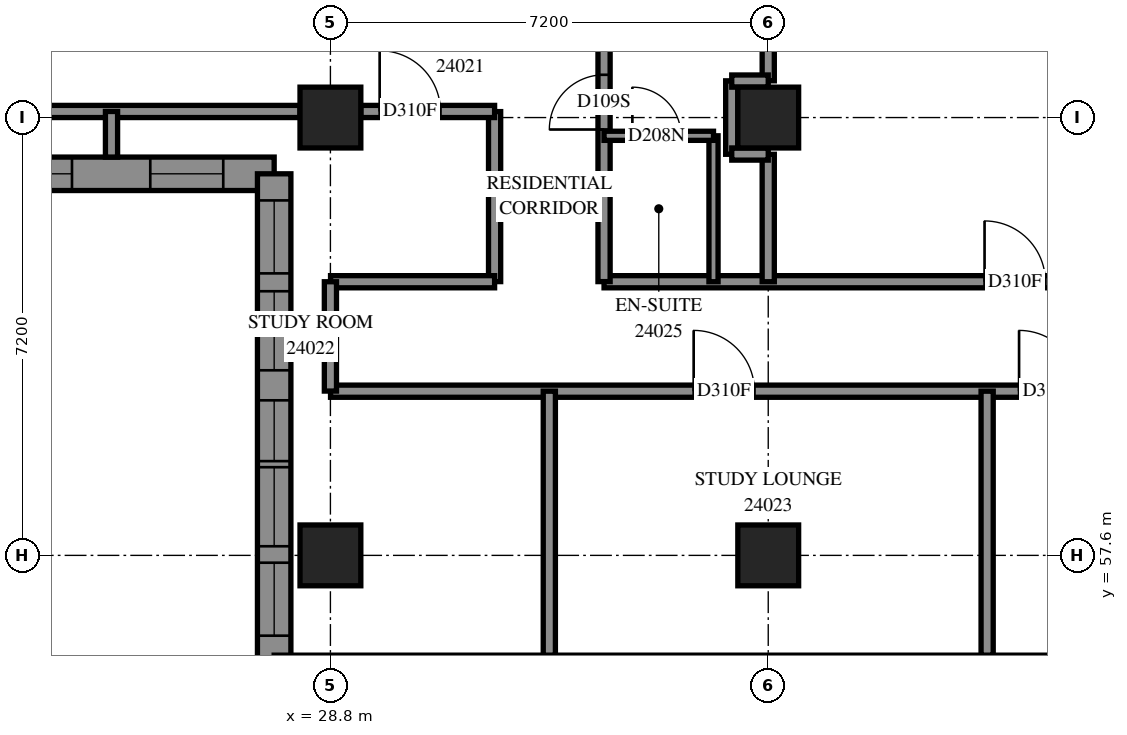
"""IFC4 building model, lengths in metres.
Left out: names, types, materials, properties, quantities, classifications, styles, units other than length and angle.
Written with IfcOpenShell. Run it as: python <this file> out.ifc"""

import sys

from ifc_helpers import new_model, si_unit, direction, frame, frame_2d, origin, origin_2d, place, context, subcontext, project, spatial, polyline, rectangle, outline, extrude, element, fill, save


model = new_model("IFC4")
c1 = context("Model", 3, precision=1e-05, world=origin(), true_north=direction((0.0, 1.0)))
c2 = subcontext(c1, "Body", "Model", "MODEL_VIEW")
j1 = project(units=[si_unit("LENGTHUNIT", "METRE"), si_unit("PLANEANGLEUNIT", "RADIAN")], contexts=[c1])
p1 = place(None, origin())
s1 = spatial("IfcSite", under=j1, at=p1, CompositionType="ELEMENT")
p2 = place(p1, origin())
s2 = spatial("IfcBuilding", under=s1, at=p2, CompositionType="ELEMENT")
p3 = place(p2, frame((0.0, 0.0, 91.4)))
s3 = spatial("IfcBuildingStorey", under=s2, at=p3, CompositionType="ELEMENT", Elevation=91.4)
for number, where, z_axis, x_axis in (
    (1, (28.8, 57.6, 0.0), (0.0, 0.0, 1.0), (1.0, 0.0, 0.0)),
    (2, (28.8, 64.8, 0.0), (0.0, 0.0, 1.0), (1.0, 0.0, 0.0)),
    (3, (36.0, 57.6, 0.0), (0.0, 0.0, 1.0), (1.0, 0.0, 0.0)),
    (4, (36.0, 64.8, 0.0), (0.0, 0.0, 1.0), (1.0, 0.0, 0.0)),
):
    element("IfcColumn", number, at=place(p3, frame(where, z_axis=z_axis, x_axis=x_axis)), inside=s3, PredefinedType="COLUMN", context=c2, shape_type="SweptSolid", body=[
        extrude(rectangle(XDim=1.0, YDim=1.0, at=origin_2d()), origin(), (0.0, 0.0, 1.0), 3.1),
    ])
p4 = place(p3, frame((19.684, 63.875, 0.0), z_axis=(0.0, 0.0, 1.0), x_axis=(1.0, 0.0, 0.0)))
e5 = element("IfcWall", 5, at=p4, inside=s3, PredefinedType="SOLIDWALL", context=c2, shape_type="SweptSolid", body=[
    extrude(outline(polyline([(-0.275, -0.275), (7.916, -0.275), (8.466, 0.275), (0.275, 0.275), (-0.275, -0.275)])), origin(), (0.0, 0.0, 1.0), 3.1),
])
p5 = place(p4, frame((2.066, 0.0, 0.5)))
e6 = element("IfcOpeningElement", 6, at=p5, cuts=e5, PredefinedType="OPENING", context=c2, shape_type="SweptSolid", body=[
    extrude(rectangle(XDim=1.3, YDim=2.45, at=frame_2d((0.65, 1.225))), frame((0.0, 0.285, 0.0), z_axis=(0.0, -1.0, 0.0), x_axis=(1.0, 0.0, 0.0)), (0.0, 0.0, 1.0), 0.57),
])
p6 = place(p4, frame((3.566, 0.0, 0.5)))
e7 = element("IfcOpeningElement", 7, at=p6, cuts=e5, PredefinedType="OPENING", context=c2, shape_type="SweptSolid", body=[
    extrude(rectangle(XDim=1.3, YDim=2.45, at=frame_2d((0.65, 1.225))), frame((0.0, 0.285, 0.0), z_axis=(0.0, -1.0, 0.0), x_axis=(1.0, 0.0, 0.0)), (0.0, 0.0, 1.0), 0.57),
])
p7 = place(p4, frame((0.596, 0.0, 0.5)))
e8 = element("IfcOpeningElement", 8, at=p7, cuts=e5, PredefinedType="OPENING", context=c2, shape_type="SweptSolid", body=[
    extrude(rectangle(XDim=1.2, YDim=2.45, at=frame_2d((0.6, 1.225))), frame((0.0, 0.285, 0.0), z_axis=(0.0, -1.0, 0.0), x_axis=(1.0, 0.0, 0.0)), (0.0, 0.0, 1.0), 0.57),
])
p8 = place(p4, frame((6.154, 0.0, 0.5)))
e9 = element("IfcOpeningElement", 9, at=p8, cuts=e5, PredefinedType="OPENING", context=c2, shape_type="SweptSolid", body=[
    extrude(rectangle(XDim=1.2, YDim=2.45, at=frame_2d((0.6, 1.225))), frame((0.0, 0.285, 0.0), z_axis=(0.0, -1.0, 0.0), x_axis=(1.0, 0.0, 0.0)), (0.0, 0.0, 1.0), 0.57),
])
p9 = place(p3, frame((27.875, 63.875, 0.0), z_axis=(0.0, 0.0, 1.0), x_axis=(0.0, -1.0, 0.0)))
e10 = element("IfcWall", 10, at=p9, inside=s3, PredefinedType="SOLIDWALL", context=c2, shape_type="SweptSolid", body=[
    extrude(outline(polyline([(0.275, -0.275), (8.466, -0.275), (7.916, 0.275), (-0.275, 0.275), (0.275, -0.275)])), origin(), (0.0, 0.0, 1.0), 3.1),
])
p10 = place(p9, frame((4.825, 0.0, 0.5)))
e11 = element("IfcOpeningElement", 11, at=p10, cuts=e10, PredefinedType="OPENING", context=c2, shape_type="SweptSolid", body=[
    extrude(rectangle(XDim=1.3, YDim=2.45, at=frame_2d((0.65, 1.225))), frame((0.0, 0.285, 0.0), z_axis=(0.0, -1.0, 0.0), x_axis=(1.0, 0.0, 0.0)), (0.0, 0.0, 1.0), 0.57),
])
p11 = place(p9, frame((0.438, 0.0, 0.5)))
e12 = element("IfcOpeningElement", 12, at=p11, cuts=e10, PredefinedType="OPENING", context=c2, shape_type="SweptSolid", body=[
    extrude(rectangle(XDim=1.2, YDim=2.45, at=frame_2d((0.6, 1.225))), frame((0.0, 0.285, 0.0), z_axis=(0.0, -1.0, 0.0), x_axis=(1.0, 0.0, 0.0)), (0.0, 0.0, 1.0), 0.57),
])
p12 = place(p9, frame((6.396, 0.0, 0.5)))
e13 = element("IfcOpeningElement", 13, at=p12, cuts=e10, PredefinedType="OPENING", context=c2, shape_type="SweptSolid", body=[
    extrude(rectangle(XDim=1.2, YDim=2.45, at=frame_2d((0.6, 1.225))), frame((0.0, 0.285, 0.0), z_axis=(0.0, -1.0, 0.0), x_axis=(1.0, 0.0, 0.0)), (0.0, 0.0, 1.0), 0.57),
])
p13 = place(p9, frame((1.931, 0.0, 0.5)))
e14 = element("IfcOpeningElement", 14, at=p13, cuts=e10, PredefinedType="OPENING", context=c2, shape_type="SweptSolid", body=[
    extrude(rectangle(XDim=1.3, YDim=2.45, at=frame_2d((0.65, 1.225))), frame((0.0, 0.285, 0.0), z_axis=(0.0, -1.0, 0.0), x_axis=(1.0, 0.0, 0.0)), (0.0, 0.0, 1.0), 0.57),
])
p14 = place(p9, frame((3.725, 0.0, 0.45)))
e15 = element("IfcOpeningElement", 15, at=p14, cuts=e10, PredefinedType="OPENING", context=c2, shape_type="SweptSolid", body=[
    extrude(rectangle(XDim=1.0, YDim=2.5, at=frame_2d((0.5, 1.25))), frame((0.0, 0.285, 0.0), z_axis=(0.0, -1.0, 0.0), x_axis=(1.0, 0.0, 0.0)), (0.0, 0.0, 1.0), 0.57),
])
p15 = place(p3, frame((28.802, 60.3, 0.0), z_axis=(0.0, 0.0, 1.0), x_axis=(1.0, 0.0, 0.0)))
e16 = element("IfcWall", 16, at=p15, inside=s3, PredefinedType="PARTITIONING", context=c2, shape_type="SweptSolid", body=[
    extrude(rectangle(XDim=24.298, YDim=0.2, at=frame_2d((12.149, 0.0))), origin(), (0.0, 0.0, 1.0), 3.1),
])
p16 = place(p15, frame((5.972, 0.0, 0.0)))
e17 = element("IfcOpeningElement", 17, at=p16, cuts=e16, PredefinedType="OPENING", context=c2, shape_type="SweptSolid", body=[
    extrude(rectangle(XDim=1.0, YDim=2.1, at=frame_2d((0.5, 1.05))), frame((0.0, 0.11, 0.0), z_axis=(0.0, -1.0, 0.0), x_axis=(1.0, 0.0, 0.0)), (0.0, 0.0, 1.0), 0.22),
])
p17 = place(p15, frame((11.323, 0.0, 0.0)))
e18 = element("IfcOpeningElement", 18, at=p17, cuts=e16, PredefinedType="OPENING", context=c2, shape_type="SweptSolid", body=[
    extrude(rectangle(XDim=1.0, YDim=2.1, at=frame_2d((0.5, 1.05))), frame((0.0, 0.11, 0.0), z_axis=(0.0, -1.0, 0.0), x_axis=(1.0, 0.0, 0.0)), (0.0, 0.0, 1.0), 0.22),
])
p18 = place(p15, frame((14.798, 0.0, 0.0)))
e19 = element("IfcOpeningElement", 19, at=p18, cuts=e16, PredefinedType="OPENING", context=c2, shape_type="SweptSolid", body=[
    extrude(rectangle(XDim=0.9, YDim=2.1, at=frame_2d((0.45, 1.05))), frame((0.0, 0.11, 0.0), z_axis=(0.0, -1.0, 0.0), x_axis=(1.0, 0.0, 0.0)), (0.0, 0.0, 1.0), 0.22),
])
p19 = place(p15, frame((18.833, 0.0, 0.0)))
e20 = element("IfcOpeningElement", 20, at=p19, cuts=e16, PredefinedType="OPENING", context=c2, shape_type="SweptSolid", body=[
    extrude(rectangle(XDim=1.0, YDim=2.1, at=frame_2d((0.5, 1.05))), frame((0.0, 0.11, 0.0), z_axis=(0.0, -1.0, 0.0), x_axis=(1.0, 0.0, 0.0)), (0.0, 0.0, 1.0), 0.22),
])
p20 = place(p15, frame((23.151, 0.0, 0.0)))
e21 = element("IfcOpeningElement", 21, at=p20, cuts=e16, PredefinedType="OPENING", context=c2, shape_type="SweptSolid", body=[
    extrude(rectangle(XDim=1.0, YDim=2.1, at=frame_2d((0.5, 1.05))), frame((0.0, 0.11, 0.0), z_axis=(0.0, -1.0, 0.0), x_axis=(1.0, 0.0, 0.0)), (0.0, 0.0, 1.0), 0.22),
])
p21 = place(p3, frame((33.3, 62.1, 0.0), z_axis=(0.0, 0.0, 1.0), x_axis=(1.0, 0.0, 0.0)))
e22 = element("IfcWall", 22, at=p21, inside=s3, PredefinedType="PARTITIONING", context=c2, shape_type="SweptSolid", body=[
    extrude(rectangle(XDim=17.1, YDim=0.2, at=frame_2d((8.55, 0.0))), origin(), (0.0, 0.0, 1.0), 3.1),
])
p22 = place(p21, frame((6.258, 0.0, 0.0)))
e23 = element("IfcOpeningElement", 23, at=p22, cuts=e22, PredefinedType="OPENING", context=c2, shape_type="SweptSolid", body=[
    extrude(rectangle(XDim=1.0, YDim=2.1, at=frame_2d((0.5, 1.05))), frame((0.0, 0.11, 0.0), z_axis=(0.0, -1.0, 0.0), x_axis=(1.0, 0.0, 0.0)), (0.0, 0.0, 1.0), 0.22),
])
p23 = place(p21, frame((10.148, 0.0, 0.0)))
e24 = element("IfcOpeningElement", 24, at=p23, cuts=e22, PredefinedType="OPENING", context=c2, shape_type="SweptSolid", body=[
    extrude(rectangle(XDim=0.9, YDim=2.1, at=frame_2d((0.45, 1.05))), frame((0.0, 0.11, 0.0), z_axis=(0.0, -1.0, 0.0), x_axis=(1.0, 0.0, 0.0)), (0.0, 0.0, 1.0), 0.22),
])
p24 = place(p21, frame((15.729, 0.0, 0.0)))
e25 = element("IfcOpeningElement", 25, at=p24, cuts=e22, PredefinedType="OPENING", context=c2, shape_type="SweptSolid", body=[
    extrude(rectangle(XDim=0.9, YDim=2.1, at=frame_2d((0.45, 1.05))), frame((0.0, 0.11, 0.0), z_axis=(0.0, -1.0, 0.0), x_axis=(1.0, 0.0, 0.0)), (0.0, 0.0, 1.0), 0.22),
])
p25 = place(p3, frame((22.1, 64.9, 0.0), z_axis=(0.0, 0.0, 1.0), x_axis=(1.0, 0.0, 0.0)))
e26 = element("IfcWall", 26, at=p25, inside=s3, PredefinedType="PARTITIONING", context=c2, shape_type="SweptSolid", body=[
    extrude(rectangle(XDim=6.2, YDim=0.2, at=frame_2d((3.1, 0.0))), origin(), (0.0, 0.0, 1.0), 2.6),
])
p26 = place(p3, frame((36.0, 65.404, 0.0), z_axis=(0.0, 0.0, 1.0), x_axis=(0.0, 1.0, 0.0)))
e27 = element("IfcWall", 27, at=p26, inside=s3, PredefinedType="PARTITIONING", context=c2, shape_type="SweptSolid", body=[
    extrude(rectangle(XDim=5.992, YDim=0.2, at=frame_2d((2.996, 0.0))), origin(), (0.0, 0.0, 1.0), 3.1),
])
p27 = place(p3, frame((33.3, 62.102, 0.0), z_axis=(0.0, 0.0, 1.0), x_axis=(0.0, 1.0, 0.0)))
e28 = element("IfcWall", 28, at=p27, inside=s3, PredefinedType="PARTITIONING", context=c2, shape_type="SweptSolid", body=[
    extrude(rectangle(XDim=4.598, YDim=0.2, at=frame_2d((2.299, 0.0))), origin(), (0.0, 0.0, 1.0), 3.1),
])
p28 = place(p27, frame((2.501, 0.0, 0.0)))
e29 = element("IfcOpeningElement", 29, at=p28, cuts=e28, PredefinedType="OPENING", context=c2, shape_type="SweptSolid", body=[
    extrude(rectangle(XDim=0.9, YDim=2.1, at=frame_2d((0.45, 1.05))), frame((0.0, 0.11, 0.0), z_axis=(0.0, -1.0, 0.0), x_axis=(1.0, 0.0, 0.0)), (0.0, 0.0, 1.0), 0.22),
])
for number, where, z_axis, x_axis in (
    (30, (32.4, 55.959, 0.0), (0.0, 0.0, 1.0), (0.0, 1.0, 0.0)),
    (31, (39.6, 55.959, 0.0), (0.0, 0.0, 1.0), (0.0, 1.0, 0.0)),
):
    element("IfcWall", number, at=place(p3, frame(where, z_axis=z_axis, x_axis=x_axis)), inside=s3, PredefinedType="PARTITIONING", context=c2, shape_type="SweptSolid", body=[
        extrude(rectangle(XDim=4.341, YDim=0.2, at=frame_2d((2.171, 0.0))), origin(), (0.0, 0.0, 1.0), 3.1),
    ])
p29 = place(p3, frame((31.5, 62.102, 0.0), z_axis=(0.0, 0.0, 1.0), x_axis=(0.0, 1.0, 0.0)))
e32 = element("IfcWall", 32, at=p29, inside=s3, PredefinedType="PARTITIONING", context=c2, shape_type="SweptSolid", body=[
    extrude(rectangle(XDim=2.796, YDim=0.2, at=frame_2d((1.398, 0.0))), origin(), (0.0, 0.0, 1.0), 3.1),
])
p30 = place(p3, frame((28.802, 62.1, 0.0), z_axis=(0.0, 0.0, 1.0), x_axis=(1.0, 0.0, 0.0)))
e33 = element("IfcWall", 33, at=p30, inside=s3, PredefinedType="PARTITIONING", context=c2, shape_type="SweptSolid", body=[
    extrude(rectangle(XDim=2.698, YDim=0.2, at=frame_2d((1.349, 0.0))), origin(), (0.0, 0.0, 1.0), 3.1),
])
p31 = place(p3, frame((35.1, 62.1, 0.0), z_axis=(0.0, 0.0, 1.0), x_axis=(0.0, 1.0, 0.0)))
e34 = element("IfcWall", 34, at=p31, inside=s3, PredefinedType="PARTITIONING", context=c2, shape_type="SweptSolid", body=[
    extrude(rectangle(XDim=2.4, YDim=0.15, at=frame_2d((1.2, 0.0))), origin(), (0.0, 0.0, 1.0), 3.1),
])
p32 = place(p3, frame((29.3, 64.9, 0.0), z_axis=(0.0, 0.0, 1.0), x_axis=(1.0, 0.0, 0.0)))
e35 = element("IfcWall", 35, at=p32, inside=s3, PredefinedType="PARTITIONING", context=c2, shape_type="SweptSolid", body=[
    extrude(rectangle(XDim=2.2, YDim=0.2, at=frame_2d((1.1, 0.0))), origin(), (0.0, 0.0, 1.0), 3.1),
])
p33 = place(p32, frame((0.31, 0.0, 0.0)))
e36 = element("IfcOpeningElement", 36, at=p33, cuts=e35, PredefinedType="OPENING", context=c2, shape_type="SweptSolid", body=[
    extrude(rectangle(XDim=1.0, YDim=2.1, at=frame_2d((0.5, 1.05))), frame((0.0, 0.11, 0.0), z_axis=(0.0, -1.0, 0.0), x_axis=(1.0, 0.0, 0.0)), (0.0, 0.0, 1.0), 0.22),
])
p34 = place(p3, frame((36.0, 62.1, 0.0), z_axis=(0.0, 0.0, 1.0), x_axis=(0.0, 1.0, 0.0)))
e37 = element("IfcWall", 37, at=p34, inside=s3, PredefinedType="PARTITIONING", context=c2, shape_type="SweptSolid", body=[
    extrude(rectangle(XDim=2.096, YDim=0.2, at=frame_2d((1.048, 0.0))), origin(), (0.0, 0.0, 1.0), 3.1),
])
p35 = place(p3, frame((33.3, 64.5, 0.0), z_axis=(0.0, 0.0, 1.0), x_axis=(1.0, 0.0, 0.0)))
e38 = element("IfcWall", 38, at=p35, inside=s3, PredefinedType="PARTITIONING", context=c2, shape_type="SweptSolid", body=[
    extrude(rectangle(XDim=1.8, YDim=0.15, at=frame_2d((0.9, 0.0))), origin(), (0.0, 0.0, 1.0), 3.1),
])
p36 = place(p35, frame((0.466, 0.0, 0.0)))
e39 = element("IfcOpeningElement", 39, at=p36, cuts=e38, PredefinedType="OPENING", context=c2, shape_type="SweptSolid", body=[
    extrude(rectangle(XDim=0.8, YDim=2.1, at=frame_2d((0.4, 1.05))), frame((0.0, 0.085, 0.0), z_axis=(0.0, -1.0, 0.0), x_axis=(1.0, 0.0, 0.0)), (0.0, 0.0, 1.0), 0.17),
])
p37 = place(p3, frame((28.8, 60.302, 0.0), z_axis=(0.0, 0.0, 1.0), x_axis=(0.0, 1.0, 0.0)))
e40 = element("IfcWall", 40, at=p37, inside=s3, PredefinedType="PARTITIONING", context=c2, shape_type="SweptSolid", body=[
    extrude(rectangle(XDim=1.798, YDim=0.2, at=frame_2d((0.899, 0.0))), origin(), (0.0, 0.0, 1.0), 2.6),
])
p38 = place(p3, frame((35.4, 64.196, 0.0), z_axis=(0.0, 0.0, 1.0), x_axis=(0.0, 1.0, 0.0)))
e41 = element("IfcWall", 41, at=p38, inside=s3, PredefinedType="PARTITIONING", context=c2, shape_type="SweptSolid", body=[
    extrude(rectangle(XDim=1.208, YDim=0.2, at=frame_2d((0.604, 0.0))), origin(), (0.0, 0.0, 1.0), 3.1),
])
p39 = place(p3, frame((25.2, 64.15, 0.0), z_axis=(0.0, 0.0, 1.0), x_axis=(0.0, 1.0, 0.0)))
e42 = element("IfcWall", 42, at=p39, inside=s3, PredefinedType="PARTITIONING", context=c2, shape_type="SweptSolid", body=[
    extrude(rectangle(XDim=0.75, YDim=0.2, at=frame_2d((0.375, 0.0))), origin(), (0.0, 0.0, 1.0), 3.1),
])
for number, where, z_axis, x_axis in (
    (43, (35.4, 65.4, 0.0), (0.0, 0.0, 1.0), (1.0, 0.0, 0.0)),
    (44, (35.4, 64.2, 0.0), (0.0, 0.0, 1.0), (1.0, 0.0, 0.0)),
):
    element("IfcWall", number, at=place(p3, frame(where, z_axis=z_axis, x_axis=x_axis)), inside=s3, PredefinedType="PARTITIONING", context=c2, shape_type="SweptSolid", body=[
        extrude(rectangle(XDim=0.6, YDim=0.2, at=frame_2d((0.3, 0.0))), origin(), (0.0, 0.0, 1.0), 3.1),
    ])
p40 = place(p6, origin())
e45 = element("IfcWindow", 45, at=p40, inside=s3, PartitioningType="SINGLE_PANEL", PredefinedType="WINDOW", context=c2, shape_type="SweptSolid", body=[
    extrude(rectangle(XDim=1.3, YDim=2.45, at=frame_2d((0.65, 1.225))), frame((0.0, 0.155, 0.0), z_axis=(0.0, -1.0, 0.0), x_axis=(1.0, 0.0, 0.0)), (0.0, 0.0, 1.0), 0.06),
])
fill(e7, e45)
p41 = place(p8, origin())
e46 = element("IfcWindow", 46, at=p41, inside=s3, PartitioningType="SINGLE_PANEL", PredefinedType="WINDOW", context=c2, shape_type="SweptSolid", body=[
    extrude(rectangle(XDim=1.2, YDim=2.45, at=frame_2d((0.6, 1.225))), frame((0.0, 0.155, 0.0), z_axis=(0.0, -1.0, 0.0), x_axis=(1.0, 0.0, 0.0)), (0.0, 0.0, 1.0), 0.06),
])
fill(e9, e46)
p42 = place(p10, origin())
e47 = element("IfcWindow", 47, at=p42, inside=s3, PartitioningType="SINGLE_PANEL", PredefinedType="WINDOW", context=c2, shape_type="SweptSolid", body=[
    extrude(rectangle(XDim=1.3, YDim=2.45, at=frame_2d((0.65, 1.225))), frame((0.0, 0.155, 0.0), z_axis=(0.0, -1.0, 0.0), x_axis=(1.0, 0.0, 0.0)), (0.0, 0.0, 1.0), 0.06),
])
fill(e11, e47)
p43 = place(p11, origin())
e48 = element("IfcWindow", 48, at=p43, inside=s3, PartitioningType="SINGLE_PANEL", PredefinedType="WINDOW", context=c2, shape_type="SweptSolid", body=[
    extrude(rectangle(XDim=1.2, YDim=2.45, at=frame_2d((0.6, 1.225))), frame((0.0, 0.155, 0.0), z_axis=(0.0, -1.0, 0.0), x_axis=(1.0, 0.0, 0.0)), (0.0, 0.0, 1.0), 0.06),
])
fill(e12, e48)
p44 = place(p12, origin())
e49 = element("IfcWindow", 49, at=p44, inside=s3, PartitioningType="SINGLE_PANEL", PredefinedType="WINDOW", context=c2, shape_type="SweptSolid", body=[
    extrude(rectangle(XDim=1.2, YDim=2.45, at=frame_2d((0.6, 1.225))), frame((0.0, 0.155, 0.0), z_axis=(0.0, -1.0, 0.0), x_axis=(1.0, 0.0, 0.0)), (0.0, 0.0, 1.0), 0.06),
])
fill(e13, e49)
p45 = place(p33, origin())
e50 = element("IfcDoor", 50, at=p45, inside=s3, OperationType="SINGLE_SWING_RIGHT", PredefinedType="DOOR", context=c2, shape_type="SweptSolid", body=[
    extrude(rectangle(XDim=1.0, YDim=2.1, at=frame_2d((0.5, 1.05))), frame((0.0, 0.025, 0.0), z_axis=(0.0, -1.0, 0.0), x_axis=(1.0, 0.0, 0.0)), (0.0, 0.0, 1.0), 0.05),
])
fill(e36, e50)
p46 = place(p16, origin())
e51 = element("IfcDoor", 51, at=p46, inside=s3, OperationType="SINGLE_SWING_RIGHT", PredefinedType="DOOR", context=c2, shape_type="SweptSolid", body=[
    extrude(rectangle(XDim=1.0, YDim=2.1, at=frame_2d((0.5, 1.05))), frame((0.0, 0.025, 0.0), z_axis=(0.0, -1.0, 0.0), x_axis=(1.0, 0.0, 0.0)), (0.0, 0.0, 1.0), 0.05),
])
fill(e17, e51)
p47 = place(p28, origin())
e52 = element("IfcDoor", 52, at=p47, inside=s3, OperationType="SINGLE_SWING_LEFT", PredefinedType="DOOR", context=c2, shape_type="SweptSolid", body=[
    extrude(rectangle(XDim=0.9, YDim=2.1, at=frame_2d((0.45, 1.05))), frame((0.0, 0.025, 0.0), z_axis=(0.0, -1.0, 0.0), x_axis=(1.0, 0.0, 0.0)), (0.0, 0.0, 1.0), 0.05),
])
fill(e29, e52)
p48 = place(p36, origin())
e53 = element("IfcDoor", 53, at=p48, inside=s3, OperationType="SINGLE_SWING_RIGHT", PredefinedType="DOOR", context=c2, shape_type="SweptSolid", body=[
    extrude(rectangle(XDim=0.8, YDim=2.1, at=frame_2d((0.4, 1.05))), frame((0.0, 0.025, 0.0), z_axis=(0.0, -1.0, 0.0), x_axis=(1.0, 0.0, 0.0)), (0.0, 0.0, 1.0), 0.05),
])
fill(e39, e53)
p49 = place(p22, origin())
e54 = element("IfcDoor", 54, at=p49, inside=s3, OperationType="SINGLE_SWING_RIGHT", PredefinedType="DOOR", context=c2, shape_type="SweptSolid", body=[
    extrude(rectangle(XDim=1.0, YDim=2.1, at=frame_2d((0.5, 1.05))), frame((0.0, 0.025, 0.0), z_axis=(0.0, -1.0, 0.0), x_axis=(1.0, 0.0, 0.0)), (0.0, 0.0, 1.0), 0.05),
])
fill(e23, e54)
p50 = place(p17, origin())
e55 = element("IfcDoor", 55, at=p50, inside=s3, OperationType="SINGLE_SWING_RIGHT", PredefinedType="DOOR", context=c2, shape_type="SweptSolid", body=[
    extrude(rectangle(XDim=1.0, YDim=2.1, at=frame_2d((0.5, 1.05))), frame((0.0, 0.025, 0.0), z_axis=(0.0, -1.0, 0.0), x_axis=(1.0, 0.0, 0.0)), (0.0, 0.0, 1.0), 0.05),
])
fill(e18, e55)
p51 = place(p13, origin())
e56 = element("IfcWindow", 56, at=p51, inside=s3, PartitioningType="SINGLE_PANEL", PredefinedType="WINDOW", context=c2, shape_type="SweptSolid", body=[
    extrude(rectangle(XDim=1.3, YDim=2.45, at=frame_2d((0.65, 1.225))), frame((0.0, 0.155, 0.0), z_axis=(0.0, -1.0, 0.0), x_axis=(1.0, 0.0, 0.0)), (0.0, 0.0, 1.0), 0.06),
])
fill(e14, e56)
p52 = place(p14, origin())
e57 = element("IfcWindow", 57, at=p52, inside=s3, PartitioningType="SINGLE_PANEL", PredefinedType="WINDOW", context=c2, shape_type="SweptSolid", body=[
    extrude(rectangle(XDim=1.0, YDim=2.5, at=frame_2d((0.5, 1.25))), frame((0.0, 0.155, 0.0), z_axis=(0.0, -1.0, 0.0), x_axis=(1.0, 0.0, 0.0)), (0.0, 0.0, 1.0), 0.06),
])
fill(e15, e57)
save(model, sys.argv[1])
